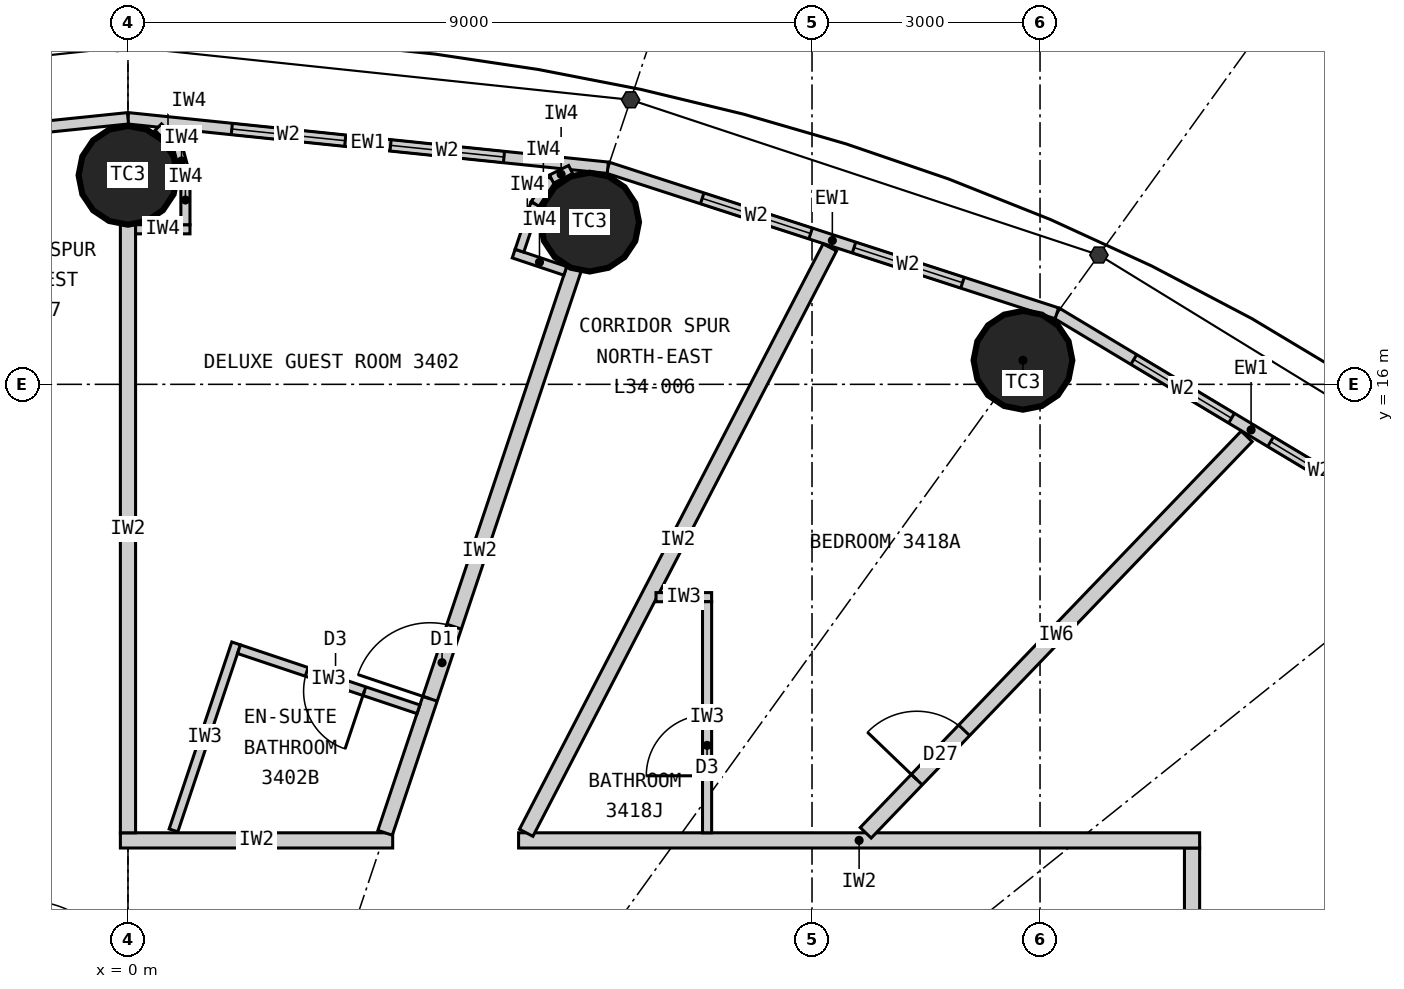
"""IFC4 building model, lengths in metres.
Left out: names, types, materials, properties, quantities, classifications, styles, units other than length and angle.
Written with IfcOpenShell. Run it as: python <this file> out.ifc"""

import sys

from ifc_helpers import new_model, si_unit, direction, frame, frame_2d, origin, origin_2d, place, context, subcontext, project, spatial, rectangle, circle, extrude, element, fill, save


model = new_model("IFC4")
c1 = context("Model", 3, precision=1e-05, world=origin(), true_north=direction((0.0, 1.0)))
c2 = subcontext(c1, "Body", "Model", "MODEL_VIEW")
j1 = project(units=[si_unit("LENGTHUNIT", "METRE"), si_unit("PLANEANGLEUNIT", "RADIAN")], contexts=[c1])
p1 = place(None, origin())
s1 = spatial("IfcSite", under=j1, at=p1, CompositionType="ELEMENT")
p2 = place(p1, origin())
s2 = spatial("IfcBuilding", under=s1, at=p2, CompositionType="ELEMENT")
p3 = place(p2, frame((0.0, 0.0, 132.0)))
s3 = spatial("IfcBuildingStorey", under=s2, at=p3, CompositionType="ELEMENT", Elevation=132.0)
for number, where, z_axis, x_axis in (
    (1, (11.775, 16.316, 0.0), (0.0, 0.0, 1.0), (1.0, 0.0, 0.0)),
    (2, (6.074, 18.135, 0.0), (0.0, 0.0, 1.0), (1.0, 0.0, 0.0)),
    (3, (0.0, 18.75, 0.0), (0.0, 0.0, 1.0), (1.0, 0.0, 0.0)),
):
    element("IfcColumn", number, at=place(p3, frame(where, z_axis=z_axis, x_axis=x_axis)), inside=s3, PredefinedType="COLUMN", context=c2, shape_type="SweptSolid", body=[
        extrude(circle(Radius=0.65, at=origin_2d()), origin(), (0.0, 0.0, 1.0), 3.3),
    ])
p4 = place(p3, frame((17.332, 13.866, 0.0), z_axis=(0.0, 0.0, 1.0), x_axis=(-0.857308573723, 0.514802884044, 0.0)))
e4 = element("IfcWall", 4, at=p4, inside=s3, PredefinedType="ELEMENTEDWALL", context=c2, shape_type="SweptSolid", body=[
    extrude(rectangle(XDim=5.961, YDim=0.15, at=frame_2d((2.98, 0.0))), origin(), (0.0, 0.0, 1.0), 3.12),
])
p5 = place(p4, frame((1.181, 0.0, 0.9)))
e5 = element("IfcOpeningElement", 5, at=p5, cuts=e4, PredefinedType="OPENING", context=c2, shape_type="SweptSolid", body=[
    extrude(rectangle(XDim=1.5, YDim=1.9, at=frame_2d((0.75, 0.95))), frame((0.0, 0.085, 0.0), z_axis=(0.0, -1.0, 0.0), x_axis=(1.0, 0.0, 0.0)), (0.0, 0.0, 1.0), 0.17),
])
p6 = place(p4, frame((3.281, 0.0, 0.9)))
e6 = element("IfcOpeningElement", 6, at=p6, cuts=e4, PredefinedType="OPENING", context=c2, shape_type="SweptSolid", body=[
    extrude(rectangle(XDim=1.5, YDim=1.9, at=frame_2d((0.75, 0.95))), frame((0.0, 0.085, 0.0), z_axis=(0.0, -1.0, 0.0), x_axis=(1.0, 0.0, 0.0)), (0.0, 0.0, 1.0), 0.17),
])
p7 = place(p3, frame((12.221, 16.935, 0.0), z_axis=(0.0, 0.0, 1.0), x_axis=(-0.951272691506, 0.308350881944, 0.0)))
e7 = element("IfcWall", 7, at=p7, inside=s3, PredefinedType="ELEMENTEDWALL", context=c2, shape_type="SweptSolid", body=[
    extrude(rectangle(XDim=6.211, YDim=0.15, at=frame_2d((3.105, 0.0))), origin(), (0.0, 0.0, 1.0), 3.12),
])
p8 = place(p7, frame((1.305, 0.0, 0.9)))
e8 = element("IfcOpeningElement", 8, at=p8, cuts=e7, PredefinedType="OPENING", context=c2, shape_type="SweptSolid", body=[
    extrude(rectangle(XDim=1.5, YDim=1.9, at=frame_2d((0.75, 0.95))), frame((0.0, 0.085, 0.0), z_axis=(0.0, -1.0, 0.0), x_axis=(1.0, 0.0, 0.0)), (0.0, 0.0, 1.0), 0.17),
])
p9 = place(p7, frame((3.405, 0.0, 0.9)))
e9 = element("IfcOpeningElement", 9, at=p9, cuts=e7, PredefinedType="OPENING", context=c2, shape_type="SweptSolid", body=[
    extrude(rectangle(XDim=1.5, YDim=1.9, at=frame_2d((0.75, 0.95))), frame((0.0, 0.085, 0.0), z_axis=(0.0, -1.0, 0.0), x_axis=(1.0, 0.0, 0.0)), (0.0, 0.0, 1.0), 0.17),
])
p10 = place(p3, frame((6.313, 18.85, 0.0), z_axis=(0.0, 0.0, 1.0), x_axis=(-0.994735690163, 0.102473931887, 0.0)))
e10 = element("IfcWall", 10, at=p10, inside=s3, PredefinedType="ELEMENTEDWALL", context=c2, shape_type="SweptSolid", body=[
    extrude(rectangle(XDim=6.347, YDim=0.15, at=frame_2d((3.173, 0.0))), origin(), (0.0, 0.0, 1.0), 3.12),
])
p11 = place(p10, frame((1.373, 0.0, 0.9)))
e11 = element("IfcOpeningElement", 11, at=p11, cuts=e10, PredefinedType="OPENING", context=c2, shape_type="SweptSolid", body=[
    extrude(rectangle(XDim=1.5, YDim=1.9, at=frame_2d((0.75, 0.95))), frame((0.0, 0.085, 0.0), z_axis=(0.0, -1.0, 0.0), x_axis=(1.0, 0.0, 0.0)), (0.0, 0.0, 1.0), 0.17),
])
p12 = place(p10, frame((3.473, 0.0, 0.9)))
e12 = element("IfcOpeningElement", 12, at=p12, cuts=e10, PredefinedType="OPENING", context=c2, shape_type="SweptSolid", body=[
    extrude(rectangle(XDim=1.5, YDim=1.9, at=frame_2d((0.75, 0.95))), frame((0.0, 0.085, 0.0), z_axis=(0.0, -1.0, 0.0), x_axis=(1.0, 0.0, 0.0)), (0.0, 0.0, 1.0), 0.17),
])
p13 = place(p3, frame((0.0, 19.5, 0.0), z_axis=(0.0, 0.0, 1.0), x_axis=(-0.994735690163, -0.102473931887, 0.0)))
e13 = element("IfcWall", 13, at=p13, inside=s3, PredefinedType="ELEMENTEDWALL", context=c2, shape_type="SweptSolid", body=[
    extrude(rectangle(XDim=6.347, YDim=0.15, at=frame_2d((3.173, 0.0))), origin(), (0.0, 0.0, 1.0), 3.12),
])
p14 = place(p13, frame((1.373, 0.0, 0.9)))
e14 = element("IfcOpeningElement", 14, at=p14, cuts=e13, PredefinedType="OPENING", context=c2, shape_type="SweptSolid", body=[
    extrude(rectangle(XDim=1.5, YDim=1.9, at=frame_2d((0.75, 0.95))), frame((0.0, 0.085, 0.0), z_axis=(0.0, -1.0, 0.0), x_axis=(1.0, 0.0, 0.0)), (0.0, 0.0, 1.0), 0.17),
])
p15 = place(p13, frame((3.473, 0.0, 0.9)))
e15 = element("IfcOpeningElement", 15, at=p15, cuts=e13, PredefinedType="OPENING", context=c2, shape_type="SweptSolid", body=[
    extrude(rectangle(XDim=1.5, YDim=1.9, at=frame_2d((0.75, 0.95))), frame((0.0, 0.085, 0.0), z_axis=(0.0, -1.0, 0.0), x_axis=(1.0, 0.0, 0.0)), (0.0, 0.0, 1.0), 0.17),
])
p16 = place(p3, frame((14.0, -9.9, 0.0), z_axis=(0.0, 0.0, 1.0), x_axis=(0.0, 1.0, 0.0)))
e16 = element("IfcWall", 16, at=p16, inside=s3, PredefinedType="PARTITIONING", context=c2, shape_type="SweptSolid", body=[
    extrude(rectangle(XDim=19.8, YDim=0.2, at=frame_2d((9.9, 0.0))), origin(), (0.0, 0.0, 1.0), 3.12),
])
p17 = place(p16, frame((1.025, 0.0, 0.0)))
e17 = element("IfcOpeningElement", 17, at=p17, cuts=e16, PredefinedType="OPENING", context=c2, shape_type="SweptSolid", body=[
    extrude(rectangle(XDim=1.0, YDim=2.2, at=frame_2d((0.5, 1.1))), frame((0.0, 0.11, 0.0), z_axis=(0.0, -1.0, 0.0), x_axis=(1.0, 0.0, 0.0)), (0.0, 0.0, 1.0), 0.22),
])
p18 = place(p16, frame((6.798, 0.0, 0.0)))
e18 = element("IfcOpeningElement", 18, at=p18, cuts=e16, PredefinedType="OPENING", context=c2, shape_type="SweptSolid", body=[
    extrude(rectangle(XDim=1.0, YDim=2.2, at=frame_2d((0.5, 1.1))), frame((0.0, 0.11, 0.0), z_axis=(0.0, -1.0, 0.0), x_axis=(1.0, 0.0, 0.0)), (0.0, 0.0, 1.0), 0.22),
])
p19 = place(p16, frame((13.242, 0.0, 0.0)))
e19 = element("IfcOpeningElement", 19, at=p19, cuts=e16, PredefinedType="OPENING", context=c2, shape_type="SweptSolid", body=[
    extrude(rectangle(XDim=1.0, YDim=2.2, at=frame_2d((0.5, 1.1))), frame((0.0, 0.11, 0.0), z_axis=(0.0, -1.0, 0.0), x_axis=(1.0, 0.0, 0.0)), (0.0, 0.0, 1.0), 0.22),
])
p20 = place(p16, frame((17.777, 0.0, 0.0)))
e20 = element("IfcOpeningElement", 20, at=p20, cuts=e16, PredefinedType="OPENING", context=c2, shape_type="SweptSolid", body=[
    extrude(rectangle(XDim=1.0, YDim=2.2, at=frame_2d((0.5, 1.1))), frame((0.0, 0.11, 0.0), z_axis=(0.0, -1.0, 0.0), x_axis=(1.0, 0.0, 0.0)), (0.0, 0.0, 1.0), 0.22),
])
p21 = place(p3, frame((-0.1, 10.0, 0.0), z_axis=(0.0, 0.0, 1.0), x_axis=(1.0, 0.0, 0.0)))
e21 = element("IfcWall", 21, at=p21, inside=s3, PredefinedType="PARTITIONING", context=c2, shape_type="SweptSolid", body=[
    extrude(rectangle(XDim=3.583, YDim=0.2, at=frame_2d((1.792, 0.0))), origin(), (0.0, 0.0, 1.0), 3.12),
])
p22 = place(p3, frame((5.139, 10.0, 0.0), z_axis=(0.0, 0.0, 1.0), x_axis=(1.0, 0.0, 0.0)))
e22 = element("IfcWall", 22, at=p22, inside=s3, PredefinedType="PARTITIONING", context=c2, shape_type="SweptSolid", body=[
    extrude(rectangle(XDim=8.961, YDim=0.2, at=frame_2d((4.48, 0.0))), origin(), (0.0, 0.0, 1.0), 3.12),
])
p23 = place(p3, frame((9.706, 10.1, 0.0), z_axis=(0.0, 0.0, 1.0), x_axis=(0.692944801824, 0.720990639069, 0.0)))
e23 = element("IfcWall", 23, at=p23, inside=s3, PredefinedType="PARTITIONING", context=c2, shape_type="SweptSolid", body=[
    extrude(rectangle(XDim=7.234, YDim=0.2, at=frame_2d((3.617, 0.0))), origin(), (0.0, 0.0, 1.0), 3.12),
])
p24 = place(p23, frame((0.97, 0.0, 0.0)))
e24 = element("IfcOpeningElement", 24, at=p24, cuts=e23, PredefinedType="OPENING", context=c2, shape_type="SweptSolid", body=[
    extrude(rectangle(XDim=0.9, YDim=2.1, at=frame_2d((0.45, 1.05))), frame((0.0, 0.11, 0.0), z_axis=(0.0, -1.0, 0.0), x_axis=(1.0, 0.0, 0.0)), (0.0, 0.0, 1.0), 0.22),
])
p25 = place(p3, frame((5.239, 10.1, 0.0), z_axis=(0.0, 0.0, 1.0), x_axis=(0.4604797896, 0.887670188398, 0.0)))
e25 = element("IfcWall", 25, at=p25, inside=s3, PredefinedType="PARTITIONING", context=c2, shape_type="SweptSolid", body=[
    extrude(rectangle(XDim=8.676, YDim=0.2, at=frame_2d((4.338, 0.0))), origin(), (0.0, 0.0, 1.0), 3.12),
])
p26 = place(p3, frame((3.383, 10.1, 0.0), z_axis=(0.0, 0.0, 1.0), x_axis=(0.317603705574, 0.948223542318, 0.0)))
e26 = element("IfcWall", 26, at=p26, inside=s3, PredefinedType="PARTITIONING", context=c2, shape_type="SweptSolid", body=[
    extrude(rectangle(XDim=7.823, YDim=0.2, at=frame_2d((3.912, 0.0))), origin(), (0.0, 0.0, 1.0), 2.27),
])
p27 = place(p26, frame((1.86, 0.0, 0.0)))
e27 = element("IfcOpeningElement", 27, at=p27, cuts=e26, PredefinedType="OPENING", context=c2, shape_type="SweptSolid", body=[
    extrude(rectangle(XDim=1.0, YDim=2.2, at=frame_2d((0.5, 1.1))), frame((0.0, 0.11, 0.0), z_axis=(0.0, -1.0, 0.0), x_axis=(1.0, 0.0, 0.0)), (0.0, 0.0, 1.0), 0.22),
])
p28 = place(p3, frame((0.0, 10.1, 0.0), z_axis=(0.0, 0.0, 1.0), x_axis=(0.0, 1.0, 0.0)))
e28 = element("IfcWall", 28, at=p28, inside=s3, PredefinedType="PARTITIONING", context=c2, shape_type="SweptSolid", body=[
    extrude(rectangle(XDim=8.0, YDim=0.2, at=frame_2d((4.0, 0.0))), origin(), (0.0, 0.0, 1.0), 2.27),
])
p29 = place(p3, frame((0.599, 10.132, 0.0), z_axis=(0.0, 0.0, 1.0), x_axis=(0.317554522053, 0.948240014724, 0.0)))
e29 = element("IfcWall", 29, at=p29, inside=s3, PredefinedType="PARTITIONING", context=c2, shape_type="SweptSolid", body=[
    extrude(rectangle(XDim=2.594, YDim=0.12, at=frame_2d((1.297, 0.0))), origin(), (0.0, 0.0, 1.0), 3.12),
])
p30 = place(p3, frame((3.822, 11.725, 0.0), z_axis=(0.0, 0.0, 1.0), x_axis=(-0.948231307998, 0.317580519761, 0.0)))
e30 = element("IfcWall", 30, at=p30, inside=s3, PredefinedType="PARTITIONING", context=c2, shape_type="SweptSolid", body=[
    extrude(rectangle(XDim=2.49, YDim=0.12, at=frame_2d((1.245, 0.0))), origin(), (0.0, 0.0, 1.0), 3.12),
])
p31 = place(p30, frame((0.75, 0.0, 0.0)))
e31 = element("IfcOpeningElement", 31, at=p31, cuts=e30, PredefinedType="OPENING", context=c2, shape_type="SweptSolid", body=[
    extrude(rectangle(XDim=0.8, YDim=2.1, at=frame_2d((0.4, 1.05))), frame((0.0, 0.07, 0.0), z_axis=(0.0, -1.0, 0.0), x_axis=(1.0, 0.0, 0.0)), (0.0, 0.0, 1.0), 0.14),
])
p32 = place(p3, frame((6.947, 13.2, 0.0), z_axis=(0.0, 0.0, 1.0), x_axis=(1.0, 0.0, 0.0)))
e32 = element("IfcWall", 32, at=p32, inside=s3, PredefinedType="PARTITIONING", context=c2, shape_type="SweptSolid", body=[
    extrude(rectangle(XDim=0.732, YDim=0.12, at=frame_2d((0.366, 0.0))), origin(), (0.0, 0.0, 1.0), 3.12),
])
p33 = place(p3, frame((7.619, 10.1, 0.0), z_axis=(0.0, 0.0, 1.0), x_axis=(0.0, 1.0, 0.0)))
e33 = element("IfcWall", 33, at=p33, inside=s3, PredefinedType="PARTITIONING", context=c2, shape_type="SweptSolid", body=[
    extrude(rectangle(XDim=3.04, YDim=0.12, at=frame_2d((1.52, 0.0))), origin(), (0.0, 0.0, 1.0), 3.12),
])
p34 = place(p33, frame((0.75, 0.0, 0.0)))
e34 = element("IfcOpeningElement", 34, at=p34, cuts=e33, PredefinedType="OPENING", context=c2, shape_type="SweptSolid", body=[
    extrude(rectangle(XDim=0.8, YDim=2.1, at=frame_2d((0.4, 1.05))), frame((0.0, 0.07, 0.0), z_axis=(0.0, -1.0, 0.0), x_axis=(1.0, 0.0, 0.0)), (0.0, 0.0, 1.0), 0.14),
])
p35 = place(p3, frame((5.754, 17.493, 0.0), z_axis=(0.0, 0.0, 1.0), x_axis=(-0.9482389443, 0.317557718397, 0.0)))
e35 = element("IfcWall", 35, at=p35, inside=s3, PredefinedType="PARTITIONING", context=c2, shape_type="SweptSolid", body=[
    extrude(rectangle(XDim=0.716, YDim=0.12, at=frame_2d((0.358, 0.0))), origin(), (0.0, 0.0, 1.0), 3.12),
])
p36 = place(p3, frame((5.151, 17.758, 0.0), z_axis=(0.0, 0.0, 1.0), x_axis=(0.317354244456, 0.948307061835, 0.0)))
e36 = element("IfcWall", 36, at=p36, inside=s3, PredefinedType="PARTITIONING", context=c2, shape_type="SweptSolid", body=[
    extrude(rectangle(XDim=0.65, YDim=0.12, at=frame_2d((0.325, 0.0))), origin(), (0.0, 0.0, 1.0), 3.12),
])
p37 = place(p3, frame((5.357, 18.375, 0.0), z_axis=(0.0, 0.0, 1.0), x_axis=(0.552249752128, 0.833678721856, 0.0)))
e37 = element("IfcWall", 37, at=p37, inside=s3, PredefinedType="PARTITIONING", context=c2, shape_type="SweptSolid", body=[
    extrude(rectangle(XDim=0.391, YDim=0.12, at=frame_2d((0.196, 0.0))), origin(), (0.0, 0.0, 1.0), 3.12),
])
p38 = place(p3, frame((5.573, 18.701, 0.0), z_axis=(0.0, 0.0, 1.0), x_axis=(0.895295561985, 0.445472621707, 0.0)))
e38 = element("IfcWall", 38, at=p38, inside=s3, PredefinedType="PARTITIONING", context=c2, shape_type="SweptSolid", body=[
    extrude(rectangle(XDim=0.281, YDim=0.12, at=frame_2d((0.14, 0.0))), origin(), (0.0, 0.0, 1.0), 3.12),
])
p39 = place(p3, frame((0.1, 18.04, 0.0), z_axis=(0.0, 0.0, 1.0), x_axis=(1.0, 0.0, 0.0)))
e39 = element("IfcWall", 39, at=p39, inside=s3, PredefinedType="PARTITIONING", context=c2, shape_type="SweptSolid", body=[
    extrude(rectangle(XDim=0.716, YDim=0.12, at=frame_2d((0.358, 0.0))), origin(), (0.0, 0.0, 1.0), 3.12),
])
p40 = place(p3, frame((0.756, 18.1, 0.0), z_axis=(0.0, 0.0, 1.0), x_axis=(0.0, 1.0, 0.0)))
e40 = element("IfcWall", 40, at=p40, inside=s3, PredefinedType="PARTITIONING", context=c2, shape_type="SweptSolid", body=[
    extrude(rectangle(XDim=0.65, YDim=0.12, at=frame_2d((0.325, 0.0))), origin(), (0.0, 0.0, 1.0), 3.12),
])
p41 = place(p3, frame((0.756, 18.75, 0.0), z_axis=(0.0, 0.0, 1.0), x_axis=(-0.2589440045, 0.965892334856, 0.0)))
e41 = element("IfcWall", 41, at=p41, inside=s3, PredefinedType="PARTITIONING", context=c2, shape_type="SweptSolid", body=[
    extrude(rectangle(XDim=0.391, YDim=0.12, at=frame_2d((0.196, 0.0))), origin(), (0.0, 0.0, 1.0), 3.12),
])
p42 = place(p3, frame((0.655, 19.128, 0.0), z_axis=(0.0, 0.0, 1.0), x_axis=(-0.707443899976, 0.706769501596, 0.0)))
e42 = element("IfcWall", 42, at=p42, inside=s3, PredefinedType="PARTITIONING", context=c2, shape_type="SweptSolid", body=[
    extrude(rectangle(XDim=0.362, YDim=0.12, at=frame_2d((0.181, 0.0))), origin(), (0.0, 0.0, 1.0), 3.12),
])
p43 = place(p5, origin())
e43 = element("IfcWindow", 43, at=p43, inside=s3, PartitioningType="SINGLE_PANEL", PredefinedType="WINDOW", context=c2, shape_type="SweptSolid", body=[
    extrude(rectangle(XDim=1.5, YDim=1.9, at=frame_2d((0.75, 0.95))), frame((0.0, 0.03, 0.0), z_axis=(0.0, -1.0, 0.0), x_axis=(1.0, 0.0, 0.0)), (0.0, 0.0, 1.0), 0.06),
])
fill(e5, e43)
p44 = place(p6, origin())
e44 = element("IfcWindow", 44, at=p44, inside=s3, PartitioningType="SINGLE_PANEL", PredefinedType="WINDOW", context=c2, shape_type="SweptSolid", body=[
    extrude(rectangle(XDim=1.5, YDim=1.9, at=frame_2d((0.75, 0.95))), frame((0.0, 0.03, 0.0), z_axis=(0.0, -1.0, 0.0), x_axis=(1.0, 0.0, 0.0)), (0.0, 0.0, 1.0), 0.06),
])
fill(e6, e44)
p45 = place(p8, origin())
e45 = element("IfcWindow", 45, at=p45, inside=s3, PartitioningType="SINGLE_PANEL", PredefinedType="WINDOW", context=c2, shape_type="SweptSolid", body=[
    extrude(rectangle(XDim=1.5, YDim=1.9, at=frame_2d((0.75, 0.95))), frame((0.0, 0.03, 0.0), z_axis=(0.0, -1.0, 0.0), x_axis=(1.0, 0.0, 0.0)), (0.0, 0.0, 1.0), 0.06),
])
fill(e8, e45)
p46 = place(p9, origin())
e46 = element("IfcWindow", 46, at=p46, inside=s3, PartitioningType="SINGLE_PANEL", PredefinedType="WINDOW", context=c2, shape_type="SweptSolid", body=[
    extrude(rectangle(XDim=1.5, YDim=1.9, at=frame_2d((0.75, 0.95))), frame((0.0, 0.03, 0.0), z_axis=(0.0, -1.0, 0.0), x_axis=(1.0, 0.0, 0.0)), (0.0, 0.0, 1.0), 0.06),
])
fill(e9, e46)
p47 = place(p11, origin())
e47 = element("IfcWindow", 47, at=p47, inside=s3, PartitioningType="SINGLE_PANEL", PredefinedType="WINDOW", context=c2, shape_type="SweptSolid", body=[
    extrude(rectangle(XDim=1.5, YDim=1.9, at=frame_2d((0.75, 0.95))), frame((0.0, 0.03, 0.0), z_axis=(0.0, -1.0, 0.0), x_axis=(1.0, 0.0, 0.0)), (0.0, 0.0, 1.0), 0.06),
])
fill(e11, e47)
p48 = place(p12, origin())
e48 = element("IfcWindow", 48, at=p48, inside=s3, PartitioningType="SINGLE_PANEL", PredefinedType="WINDOW", context=c2, shape_type="SweptSolid", body=[
    extrude(rectangle(XDim=1.5, YDim=1.9, at=frame_2d((0.75, 0.95))), frame((0.0, 0.03, 0.0), z_axis=(0.0, -1.0, 0.0), x_axis=(1.0, 0.0, 0.0)), (0.0, 0.0, 1.0), 0.06),
])
fill(e12, e48)
p49 = place(p31, origin())
e49 = element("IfcDoor", 49, at=p49, inside=s3, OperationType="SINGLE_SWING_LEFT", PredefinedType="DOOR", context=c2, shape_type="SweptSolid", body=[
    extrude(rectangle(XDim=0.8, YDim=2.1, at=frame_2d((0.4, 1.05))), frame((0.0, 0.025, 0.0), z_axis=(0.0, -1.0, 0.0), x_axis=(1.0, 0.0, 0.0)), (0.0, 0.0, 1.0), 0.05),
])
fill(e31, e49)
p50 = place(p27, origin())
e50 = element("IfcDoor", 50, at=p50, inside=s3, OperationType="SINGLE_SWING_LEFT", PredefinedType="DOOR", context=c2, shape_type="SweptSolid", body=[
    extrude(rectangle(XDim=1.0, YDim=2.2, at=frame_2d((0.5, 1.1))), frame((0.0, 0.025, 0.0), z_axis=(0.0, -1.0, 0.0), x_axis=(1.0, 0.0, 0.0)), (0.0, 0.0, 1.0), 0.05),
])
fill(e27, e50)
p51 = place(p34, origin())
e51 = element("IfcDoor", 51, at=p51, inside=s3, OperationType="SINGLE_SWING_LEFT", PredefinedType="DOOR", context=c2, shape_type="SweptSolid", body=[
    extrude(rectangle(XDim=0.8, YDim=2.1, at=frame_2d((0.4, 1.05))), frame((0.0, 0.025, 0.0), z_axis=(0.0, -1.0, 0.0), x_axis=(1.0, 0.0, 0.0)), (0.0, 0.0, 1.0), 0.05),
])
fill(e34, e51)
p52 = place(p24, origin())
e52 = element("IfcDoor", 52, at=p52, inside=s3, OperationType="SINGLE_SWING_LEFT", PredefinedType="DOOR", context=c2, shape_type="SweptSolid", body=[
    extrude(rectangle(XDim=0.9, YDim=2.1, at=frame_2d((0.45, 1.05))), frame((0.0, 0.025, 0.0), z_axis=(0.0, -1.0, 0.0), x_axis=(1.0, 0.0, 0.0)), (0.0, 0.0, 1.0), 0.05),
])
fill(e24, e52)
save(model, sys.argv[1])
